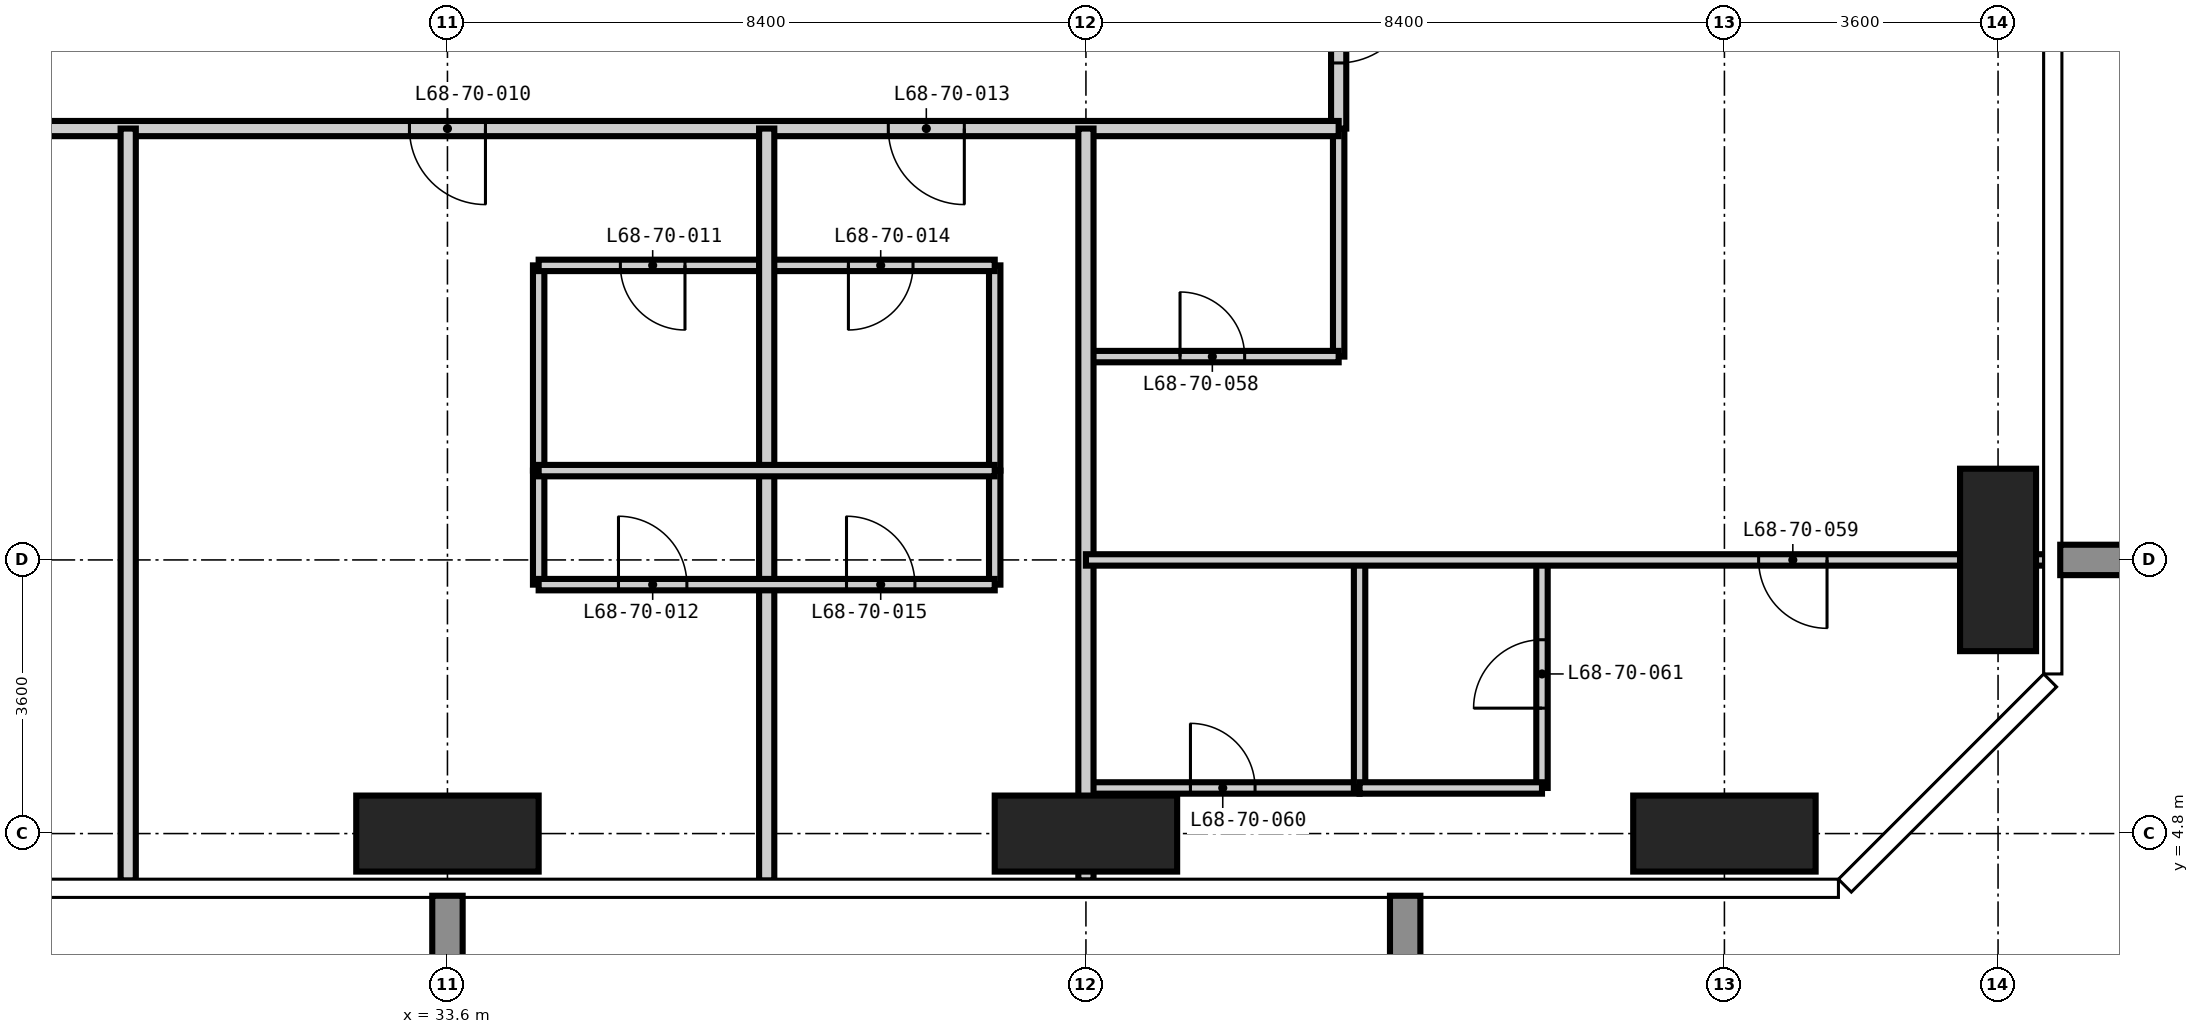
"""IFC4 building model, lengths in metres.
Left out: names, types, materials, properties, quantities, classifications, styles, units other than length and angle.
Written with IfcOpenShell. Run it as: python <this file> out.ifc"""

import sys

from ifc_helpers import new_model, si_unit, direction, frame, frame_2d, origin, origin_2d, place, context, subcontext, project, spatial, rectangle, extrude, element, fill, save


model = new_model("IFC4")
c1 = context("Model", 3, precision=1e-05, world=origin(), true_north=direction((0.0, 1.0)))
c2 = subcontext(c1, "Body", "Model", "MODEL_VIEW")
j1 = project(units=[si_unit("LENGTHUNIT", "METRE"), si_unit("PLANEANGLEUNIT", "RADIAN")], contexts=[c1])
p1 = place(None, origin())
s1 = spatial("IfcSite", under=j1, at=p1, CompositionType="ELEMENT")
p2 = place(p1, origin())
s2 = spatial("IfcBuilding", under=s1, at=p2, CompositionType="ELEMENT")
p3 = place(p2, frame((0.0, 0.0, 264.6)))
s3 = spatial("IfcBuildingStorey", under=s2, at=p3, CompositionType="ELEMENT", Elevation=264.6)
for number, where, z_axis, x_axis in (
    (1, (33.6, 4.8, -0.35), (0.0, 0.0, 1.0), (1.0, 0.0, 0.0)),
    (2, (42.0, 4.8, -0.35), (0.0, 0.0, 1.0), (1.0, 0.0, 0.0)),
    (3, (50.4, 4.8, -0.35), (0.0, 0.0, 1.0), (1.0, 0.0, 0.0)),
):
    element("IfcColumn", number, at=place(p3, frame(where, z_axis=z_axis, x_axis=x_axis)), inside=s3, PredefinedType="COLUMN", context=c2, shape_type="SweptSolid", body=[
        extrude(rectangle(XDim=2.4, YDim=1.0, at=origin_2d()), origin(), (0.0, 0.0, 1.0), 3.9),
    ])
p4 = place(p3, frame((54.0, 8.4, -0.35), z_axis=(0.0, 0.0, 1.0), x_axis=(1.0, 0.0, 0.0)))
e4 = element("IfcColumn", 4, at=p4, inside=s3, PredefinedType="COLUMN", context=c2, shape_type="SweptSolid", body=[
    extrude(rectangle(XDim=1.0, YDim=2.4, at=origin_2d()), origin(), (0.0, 0.0, 1.0), 3.9),
])
for number, where, z_axis, x_axis in (
    (5, (34.8, 9.575, 0.0), (0.0, 0.0, 1.0), (0.0, 1.0, 0.0)),
    (6, (40.8, 9.575, 0.0), (0.0, 0.0, 1.0), (0.0, 1.0, 0.0)),
):
    element("IfcWall", number, at=place(p3, frame(where, z_axis=z_axis, x_axis=x_axis)), inside=s3, PredefinedType="PARTITIONING", context=c2, shape_type="SweptSolid", body=[
        extrude(rectangle(XDim=2.7, YDim=0.15, at=frame_2d((1.35, 0.0))), origin(), (0.0, 0.0, 1.0), 3.55),
    ])
p5 = place(p3, frame((45.325, 11.075, 0.0), z_axis=(0.0, 0.0, 1.0), x_axis=(0.0, 1.0, 0.0)))
e7 = element("IfcWall", 7, at=p5, inside=s3, PredefinedType="PARTITIONING", context=c2, shape_type="SweptSolid", body=[
    extrude(rectangle(XDim=3.0, YDim=0.15, at=frame_2d((1.5, 0.0))), origin(), (0.0, 0.0, 1.0), 3.55),
])
p6 = place(p3, frame((42.0, 5.4, 0.0), z_axis=(0.0, 0.0, 1.0), x_axis=(1.0, 0.0, 0.0)))
e8 = element("IfcWall", 8, at=p6, inside=s3, PredefinedType="PARTITIONING", context=c2, shape_type="SweptSolid", body=[
    extrude(rectangle(XDim=3.6, YDim=0.15, at=frame_2d((1.8, 0.0))), origin(), (0.0, 0.0, 1.0), 3.55),
])
p7 = place(p6, frame((1.375, 0.0, 0.0)))
e9 = element("IfcOpeningElement", 9, at=p7, cuts=e8, PredefinedType="OPENING", context=c2, shape_type="SweptSolid", body=[
    extrude(rectangle(XDim=0.85, YDim=2.1, at=frame_2d((0.425, 1.05))), frame((0.0, 0.085, 0.0), z_axis=(0.0, -1.0, 0.0), x_axis=(1.0, 0.0, 0.0)), (0.0, 0.0, 1.0), 0.17),
])
p8 = place(p3, frame((42.0, 11.075, 0.0), z_axis=(0.0, 0.0, 1.0), x_axis=(1.0, 0.0, 0.0)))
e10 = element("IfcWall", 10, at=p8, inside=s3, PredefinedType="PARTITIONING", context=c2, shape_type="SweptSolid", body=[
    extrude(rectangle(XDim=3.325, YDim=0.15, at=frame_2d((1.663, 0.0))), origin(), (0.0, 0.0, 1.0), 3.55),
])
p9 = place(p8, frame((1.238, 0.0, 0.0)))
e11 = element("IfcOpeningElement", 11, at=p9, cuts=e10, PredefinedType="OPENING", context=c2, shape_type="SweptSolid", body=[
    extrude(rectangle(XDim=0.85, YDim=2.1, at=frame_2d((0.425, 1.05))), frame((0.0, 0.085, 0.0), z_axis=(0.0, -1.0, 0.0), x_axis=(1.0, 0.0, 0.0)), (0.0, 0.0, 1.0), 0.17),
])
p10 = place(p3, frame((34.8, 12.275, 0.0), z_axis=(0.0, 0.0, 1.0), x_axis=(1.0, 0.0, 0.0)))
e12 = element("IfcWall", 12, at=p10, inside=s3, PredefinedType="PARTITIONING", context=c2, shape_type="SweptSolid", body=[
    extrude(rectangle(XDim=6.0, YDim=0.15, at=frame_2d((3.0, 0.0))), origin(), (0.0, 0.0, 1.0), 3.55),
])
p11 = place(p10, frame((1.075, 0.0, 0.0)))
e13 = element("IfcOpeningElement", 13, at=p11, cuts=e12, PredefinedType="OPENING", context=c2, shape_type="SweptSolid", body=[
    extrude(rectangle(XDim=0.85, YDim=2.1, at=frame_2d((0.425, 1.05))), frame((0.0, 0.085, 0.0), z_axis=(0.0, -1.0, 0.0), x_axis=(1.0, 0.0, 0.0)), (0.0, 0.0, 1.0), 0.17),
])
p12 = place(p10, frame((4.075, 0.0, 0.0)))
e14 = element("IfcOpeningElement", 14, at=p12, cuts=e12, PredefinedType="OPENING", context=c2, shape_type="SweptSolid", body=[
    extrude(rectangle(XDim=0.85, YDim=2.1, at=frame_2d((0.425, 1.05))), frame((0.0, 0.085, 0.0), z_axis=(0.0, -1.0, 0.0), x_axis=(1.0, 0.0, 0.0)), (0.0, 0.0, 1.0), 0.17),
])
p13 = place(p3, frame((45.325, 33.6, 0.0), z_axis=(0.0, 0.0, 1.0), x_axis=(0.0, -1.0, 0.0)))
e15 = element("IfcWall", 15, at=p13, inside=s3, PredefinedType="PARTITIONING", context=c2, shape_type="SweptSolid", body=[
    extrude(rectangle(XDim=19.525, YDim=0.2, at=frame_2d((9.763, 0.0))), origin(), (0.0, 0.0, 1.0), 3.55),
])
p14 = place(p13, frame((9.1, 0.0, 0.0)))
e16 = element("IfcOpeningElement", 16, at=p14, cuts=e15, PredefinedType="OPENING", context=c2, shape_type="SweptSolid", body=[
    extrude(rectangle(XDim=1.0, YDim=2.2, at=frame_2d((0.5, 1.1))), frame((0.0, 0.11, 0.0), z_axis=(0.0, -1.0, 0.0), x_axis=(1.0, 0.0, 0.0)), (0.0, 0.0, 1.0), 0.22),
])
p15 = place(p13, frame((17.662, 0.0, 0.0)))
e17 = element("IfcOpeningElement", 17, at=p15, cuts=e15, PredefinedType="OPENING", context=c2, shape_type="SweptSolid", body=[
    extrude(rectangle(XDim=1.0, YDim=2.2, at=frame_2d((0.5, 1.1))), frame((0.0, 0.11, 0.0), z_axis=(0.0, -1.0, 0.0), x_axis=(1.0, 0.0, 0.0)), (0.0, 0.0, 1.0), 0.22),
])
p16 = place(p3, frame((45.325, 14.075, 0.0), z_axis=(0.0, 0.0, 1.0), x_axis=(-1.0, 0.0, 0.0)))
e18 = element("IfcWall", 18, at=p16, inside=s3, PredefinedType="PARTITIONING", context=c2, shape_type="SweptSolid", body=[
    extrude(rectangle(XDim=22.85, YDim=0.2, at=frame_2d((11.425, 0.0))), origin(), (0.0, 0.0, 1.0), 3.55),
])
p17 = place(p16, frame((17.525, 0.0, 0.0)))
e19 = element("IfcOpeningElement", 19, at=p17, cuts=e18, PredefinedType="OPENING", context=c2, shape_type="SweptSolid", body=[
    extrude(rectangle(XDim=1.0, YDim=2.2, at=frame_2d((0.5, 1.1))), frame((0.0, 0.11, 0.0), z_axis=(0.0, -1.0, 0.0), x_axis=(1.0, 0.0, 0.0)), (0.0, 0.0, 1.0), 0.22),
])
p18 = place(p16, frame((11.225, 0.0, 0.0)))
e20 = element("IfcOpeningElement", 20, at=p18, cuts=e18, PredefinedType="OPENING", context=c2, shape_type="SweptSolid", body=[
    extrude(rectangle(XDim=1.0, YDim=2.2, at=frame_2d((0.5, 1.1))), frame((0.0, 0.11, 0.0), z_axis=(0.0, -1.0, 0.0), x_axis=(1.0, 0.0, 0.0)), (0.0, 0.0, 1.0), 0.22),
])
p19 = place(p16, frame((4.925, 0.0, 0.0)))
e21 = element("IfcOpeningElement", 21, at=p19, cuts=e18, PredefinedType="OPENING", context=c2, shape_type="SweptSolid", body=[
    extrude(rectangle(XDim=1.0, YDim=2.2, at=frame_2d((0.5, 1.1))), frame((0.0, 0.11, 0.0), z_axis=(0.0, -1.0, 0.0), x_axis=(1.0, 0.0, 0.0)), (0.0, 0.0, 1.0), 0.22),
])
for number, where, z_axis, x_axis in (
    (22, (29.4, 4.182, 0.0), (0.0, 0.0, 1.0), (0.0, 1.0, 0.0)),
    (23, (37.8, 4.182, 0.0), (0.0, 0.0, 1.0), (0.0, 1.0, 0.0)),
    (24, (42.0, 4.182, 0.0), (0.0, 0.0, 1.0), (0.0, 1.0, 0.0)),
):
    element("IfcWall", number, at=place(p3, frame(where, z_axis=z_axis, x_axis=x_axis)), inside=s3, PredefinedType="PARTITIONING", context=c2, shape_type="SweptSolid", body=[
        extrude(rectangle(XDim=9.893, YDim=0.2, at=frame_2d((4.947, 0.0))), origin(), (0.0, 0.0, 1.0), 3.55),
    ])
for number, where, z_axis, x_axis in (
    (25, (34.8, 8.075, 0.0), (0.0, 0.0, 1.0), (0.0, 1.0, 0.0)),
    (26, (40.8, 8.075, 0.0), (0.0, 0.0, 1.0), (0.0, 1.0, 0.0)),
):
    element("IfcWall", number, at=place(p3, frame(where, z_axis=z_axis, x_axis=x_axis)), inside=s3, PredefinedType="PARTITIONING", context=c2, shape_type="SweptSolid", body=[
        extrude(rectangle(XDim=1.5, YDim=0.15, at=frame_2d((0.75, 0.0))), origin(), (0.0, 0.0, 1.0), 3.55),
    ])
p20 = place(p3, frame((45.6, 5.4, 0.0), z_axis=(0.0, 0.0, 1.0), x_axis=(0.0, 1.0, 0.0)))
e27 = element("IfcWall", 27, at=p20, inside=s3, PredefinedType="PARTITIONING", context=c2, shape_type="SweptSolid", body=[
    extrude(rectangle(XDim=3.0, YDim=0.15, at=frame_2d((1.5, 0.0))), origin(), (0.0, 0.0, 1.0), 3.55),
])
p21 = place(p3, frame((48.0, 5.4, 0.0), z_axis=(0.0, 0.0, 1.0), x_axis=(0.0, 1.0, 0.0)))
e28 = element("IfcWall", 28, at=p21, inside=s3, PredefinedType="PARTITIONING", context=c2, shape_type="SweptSolid", body=[
    extrude(rectangle(XDim=3.0, YDim=0.15, at=frame_2d((1.5, 0.0))), origin(), (0.0, 0.0, 1.0), 3.55),
])
p22 = place(p21, frame((1.05, 0.0, 0.0)))
e29 = element("IfcOpeningElement", 29, at=p22, cuts=e28, PredefinedType="OPENING", context=c2, shape_type="SweptSolid", body=[
    extrude(rectangle(XDim=0.9, YDim=2.1, at=frame_2d((0.45, 1.05))), frame((0.0, 0.085, 0.0), z_axis=(0.0, -1.0, 0.0), x_axis=(1.0, 0.0, 0.0)), (0.0, 0.0, 1.0), 0.17),
])
p23 = place(p3, frame((45.6, 5.4, 0.0), z_axis=(0.0, 0.0, 1.0), x_axis=(1.0, 0.0, 0.0)))
e30 = element("IfcWall", 30, at=p23, inside=s3, PredefinedType="PARTITIONING", context=c2, shape_type="SweptSolid", body=[
    extrude(rectangle(XDim=2.4, YDim=0.15, at=frame_2d((1.2, 0.0))), origin(), (0.0, 0.0, 1.0), 3.55),
])
p24 = place(p3, frame((34.8, 8.075, 0.0), z_axis=(0.0, 0.0, 1.0), x_axis=(1.0, 0.0, 0.0)))
e31 = element("IfcWall", 31, at=p24, inside=s3, PredefinedType="PARTITIONING", context=c2, shape_type="SweptSolid", body=[
    extrude(rectangle(XDim=6.0, YDim=0.15, at=frame_2d((3.0, 0.0))), origin(), (0.0, 0.0, 1.0), 3.55),
])
p25 = place(p24, frame((1.05, 0.0, 0.0)))
e32 = element("IfcOpeningElement", 32, at=p25, cuts=e31, PredefinedType="OPENING", context=c2, shape_type="SweptSolid", body=[
    extrude(rectangle(XDim=0.9, YDim=2.1, at=frame_2d((0.45, 1.05))), frame((0.0, 0.085, 0.0), z_axis=(0.0, -1.0, 0.0), x_axis=(1.0, 0.0, 0.0)), (0.0, 0.0, 1.0), 0.17),
])
p26 = place(p24, frame((4.05, 0.0, 0.0)))
e33 = element("IfcOpeningElement", 33, at=p26, cuts=e31, PredefinedType="OPENING", context=c2, shape_type="SweptSolid", body=[
    extrude(rectangle(XDim=0.9, YDim=2.1, at=frame_2d((0.45, 1.05))), frame((0.0, 0.085, 0.0), z_axis=(0.0, -1.0, 0.0), x_axis=(1.0, 0.0, 0.0)), (0.0, 0.0, 1.0), 0.17),
])
p27 = place(p3, frame((42.0, 8.4, 0.0), z_axis=(0.0, 0.0, 1.0), x_axis=(1.0, 0.0, 0.0)))
e34 = element("IfcWall", 34, at=p27, inside=s3, PredefinedType="PARTITIONING", context=c2, shape_type="SweptSolid", body=[
    extrude(rectangle(XDim=12.618, YDim=0.15, at=frame_2d((6.309, 0.0))), origin(), (0.0, 0.0, 1.0), 3.55),
])
p28 = place(p27, frame((8.85, 0.0, 0.0)))
e35 = element("IfcOpeningElement", 35, at=p28, cuts=e34, PredefinedType="OPENING", context=c2, shape_type="SweptSolid", body=[
    extrude(rectangle(XDim=0.9, YDim=2.1, at=frame_2d((0.45, 1.05))), frame((0.0, 0.085, 0.0), z_axis=(0.0, -1.0, 0.0), x_axis=(1.0, 0.0, 0.0)), (0.0, 0.0, 1.0), 0.17),
])
p29 = place(p3, frame((34.8, 9.575, 0.0), z_axis=(0.0, 0.0, 1.0), x_axis=(1.0, 0.0, 0.0)))
e36 = element("IfcWall", 36, at=p29, inside=s3, PredefinedType="PARTITIONING", context=c2, shape_type="SweptSolid", body=[
    extrude(rectangle(XDim=6.0, YDim=0.15, at=frame_2d((3.0, 0.0))), origin(), (0.0, 0.0, 1.0), 3.55),
])
p30 = place(p18, origin())
e37 = element("IfcDoor", 37, at=p30, inside=s3, OperationType="SINGLE_SWING_LEFT", PredefinedType="DOOR", context=c2, shape_type="SweptSolid", body=[
    extrude(rectangle(XDim=1.0, YDim=2.2, at=frame_2d((0.5, 1.1))), frame((0.0, 0.025, 0.0), z_axis=(0.0, -1.0, 0.0), x_axis=(1.0, 0.0, 0.0)), (0.0, 0.0, 1.0), 0.05),
])
fill(e20, e37)
p31 = place(p11, frame((0.85, 0.0, 0.0), z_axis=(0.0, 0.0, 1.0), x_axis=(-1.0, 0.0, 0.0)))
e38 = element("IfcDoor", 38, at=p31, inside=s3, OperationType="SINGLE_SWING_LEFT", PredefinedType="DOOR", context=c2, shape_type="SweptSolid", body=[
    extrude(rectangle(XDim=0.85, YDim=2.1, at=frame_2d((0.425, 1.05))), frame((0.0, 0.025, 0.0), z_axis=(0.0, -1.0, 0.0), x_axis=(1.0, 0.0, 0.0)), (0.0, 0.0, 1.0), 0.05),
])
fill(e13, e38)
p32 = place(p25, origin())
e39 = element("IfcDoor", 39, at=p32, inside=s3, OperationType="SINGLE_SWING_LEFT", PredefinedType="DOOR", context=c2, shape_type="SweptSolid", body=[
    extrude(rectangle(XDim=0.9, YDim=2.1, at=frame_2d((0.45, 1.05))), frame((0.0, 0.025, 0.0), z_axis=(0.0, -1.0, 0.0), x_axis=(1.0, 0.0, 0.0)), (0.0, 0.0, 1.0), 0.05),
])
fill(e32, e39)
p33 = place(p19, origin())
e40 = element("IfcDoor", 40, at=p33, inside=s3, OperationType="SINGLE_SWING_LEFT", PredefinedType="DOOR", context=c2, shape_type="SweptSolid", body=[
    extrude(rectangle(XDim=1.0, YDim=2.2, at=frame_2d((0.5, 1.1))), frame((0.0, 0.025, 0.0), z_axis=(0.0, -1.0, 0.0), x_axis=(1.0, 0.0, 0.0)), (0.0, 0.0, 1.0), 0.05),
])
fill(e21, e40)
p34 = place(p12, frame((0.85, 0.0, 0.0), z_axis=(0.0, 0.0, 1.0), x_axis=(-1.0, 0.0, 0.0)))
e41 = element("IfcDoor", 41, at=p34, inside=s3, OperationType="SINGLE_SWING_RIGHT", PredefinedType="DOOR", context=c2, shape_type="SweptSolid", body=[
    extrude(rectangle(XDim=0.85, YDim=2.1, at=frame_2d((0.425, 1.05))), frame((0.0, 0.025, 0.0), z_axis=(0.0, -1.0, 0.0), x_axis=(1.0, 0.0, 0.0)), (0.0, 0.0, 1.0), 0.05),
])
fill(e14, e41)
p35 = place(p26, origin())
e42 = element("IfcDoor", 42, at=p35, inside=s3, OperationType="SINGLE_SWING_LEFT", PredefinedType="DOOR", context=c2, shape_type="SweptSolid", body=[
    extrude(rectangle(XDim=0.9, YDim=2.1, at=frame_2d((0.45, 1.05))), frame((0.0, 0.025, 0.0), z_axis=(0.0, -1.0, 0.0), x_axis=(1.0, 0.0, 0.0)), (0.0, 0.0, 1.0), 0.05),
])
fill(e33, e42)
p36 = place(p15, origin())
e43 = element("IfcDoor", 43, at=p36, inside=s3, OperationType="SINGLE_SWING_LEFT", PredefinedType="DOOR", context=c2, shape_type="SweptSolid", body=[
    extrude(rectangle(XDim=1.0, YDim=2.2, at=frame_2d((0.5, 1.1))), frame((0.0, 0.025, 0.0), z_axis=(0.0, -1.0, 0.0), x_axis=(1.0, 0.0, 0.0)), (0.0, 0.0, 1.0), 0.05),
])
fill(e17, e43)
p37 = place(p9, origin())
e44 = element("IfcDoor", 44, at=p37, inside=s3, OperationType="SINGLE_SWING_LEFT", PredefinedType="DOOR", context=c2, shape_type="SweptSolid", body=[
    extrude(rectangle(XDim=0.85, YDim=2.1, at=frame_2d((0.425, 1.05))), frame((0.0, 0.025, 0.0), z_axis=(0.0, -1.0, 0.0), x_axis=(1.0, 0.0, 0.0)), (0.0, 0.0, 1.0), 0.05),
])
fill(e11, e44)
p38 = place(p28, frame((0.9, 0.0, 0.0), z_axis=(0.0, 0.0, 1.0), x_axis=(-1.0, 0.0, 0.0)))
e45 = element("IfcDoor", 45, at=p38, inside=s3, OperationType="SINGLE_SWING_LEFT", PredefinedType="DOOR", context=c2, shape_type="SweptSolid", body=[
    extrude(rectangle(XDim=0.9, YDim=2.1, at=frame_2d((0.45, 1.05))), frame((0.0, 0.025, 0.0), z_axis=(0.0, -1.0, 0.0), x_axis=(1.0, 0.0, 0.0)), (0.0, 0.0, 1.0), 0.05),
])
fill(e35, e45)
p39 = place(p7, origin())
e46 = element("IfcDoor", 46, at=p39, inside=s3, OperationType="SINGLE_SWING_LEFT", PredefinedType="DOOR", context=c2, shape_type="SweptSolid", body=[
    extrude(rectangle(XDim=0.85, YDim=2.1, at=frame_2d((0.425, 1.05))), frame((0.0, 0.025, 0.0), z_axis=(0.0, -1.0, 0.0), x_axis=(1.0, 0.0, 0.0)), (0.0, 0.0, 1.0), 0.05),
])
fill(e9, e46)
p40 = place(p22, origin())
e47 = element("IfcDoor", 47, at=p40, inside=s3, OperationType="SINGLE_SWING_LEFT", PredefinedType="DOOR", context=c2, shape_type="SweptSolid", body=[
    extrude(rectangle(XDim=0.9, YDim=2.1, at=frame_2d((0.45, 1.05))), frame((0.0, 0.025, 0.0), z_axis=(0.0, -1.0, 0.0), x_axis=(1.0, 0.0, 0.0)), (0.0, 0.0, 1.0), 0.05),
])
fill(e29, e47)
save(model, sys.argv[1])
